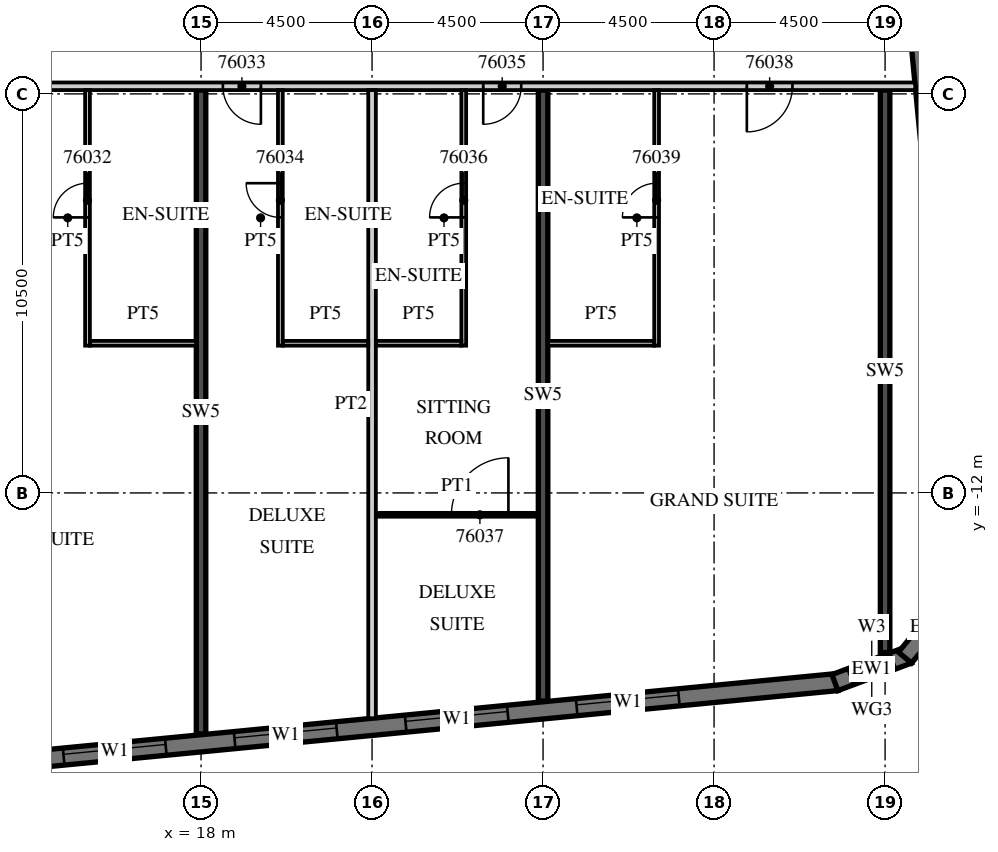
"""IFC4 building model, lengths in metres.
Left out: names, types, materials, properties, quantities, classifications, styles, units other than length and angle.
Written with IfcOpenShell. Run it as: python <this file> out.ifc"""

import sys

from ifc_helpers import new_model, si_unit, direction, frame, frame_2d, origin, place, context, subcontext, project, spatial, polyline, rectangle, outline, extrude, element, fill, save


model = new_model("IFC4")
c1 = context("Model", 3, precision=1e-05, world=origin(), true_north=direction((0.0, 1.0)))
c2 = subcontext(c1, "Body", "Model", "MODEL_VIEW")
j1 = project(units=[si_unit("LENGTHUNIT", "METRE"), si_unit("PLANEANGLEUNIT", "RADIAN")], contexts=[c1])
p1 = place(None, origin())
s1 = spatial("IfcSite", under=j1, at=p1, CompositionType="ELEMENT")
p2 = place(p1, origin())
s2 = spatial("IfcBuilding", under=s1, at=p2, CompositionType="ELEMENT")
p3 = place(p2, frame((0.0, 0.0, 301.5)))
s3 = spatial("IfcBuildingStorey", under=s2, at=p3, CompositionType="ELEMENT", Elevation=301.5)
p4 = place(p3, frame((18.0, -18.341, 0.0), z_axis=(0.0, 0.0, 1.0), x_axis=(0.0, 1.0, 0.0)))
e1 = element("IfcWall", 1, at=p4, inside=s3, PredefinedType="SHEAR", context=c2, shape_type="SweptSolid", body=[
    extrude(rectangle(XDim=16.941, YDim=0.25, at=frame_2d((8.47, 0.0))), origin(), (0.0, 0.0, 1.0), 3.3),
])
p5 = place(p3, frame((27.0, -17.474, 0.0), z_axis=(0.0, 0.0, 1.0), x_axis=(0.0, 1.0, 0.0)))
e2 = element("IfcWall", 2, at=p5, inside=s3, PredefinedType="SHEAR", context=c2, shape_type="SweptSolid", body=[
    extrude(rectangle(XDim=16.074, YDim=0.25, at=frame_2d((8.037, 0.0))), origin(), (0.0, 0.0, 1.0), 3.3),
])
p6 = place(p3, frame((36.0, -16.199, 0.0), z_axis=(0.0, 0.0, 1.0), x_axis=(0.0, 1.0, 0.0)))
e3 = element("IfcWall", 3, at=p6, inside=s3, PredefinedType="SHEAR", context=c2, shape_type="SweptSolid", body=[
    extrude(rectangle(XDim=14.799, YDim=0.25, at=frame_2d((7.399, 0.0))), origin(), (0.0, 0.0, 1.0), 3.3),
])
p7 = place(p3, frame((-13.521, -21.624, 0.0), z_axis=(0.0, 0.0, 1.0), x_axis=(0.995396186218, 0.095845878695, 0.0)))
e4 = element("IfcWall", 4, at=p7, inside=s3, PredefinedType="SOLIDWALL", context=c2, shape_type="SweptSolid", body=[
    extrude(rectangle(XDim=48.481, YDim=0.45, at=frame_2d((24.241, 0.0))), origin(), (0.0, 0.0, 1.0), 3.02),
])
p8 = place(p7, frame((0.91, 0.0, 0.45)))
e5 = element("IfcOpeningElement", 5, at=p8, cuts=e4, PredefinedType="OPENING", context=c2, shape_type="SweptSolid", body=[
    extrude(rectangle(XDim=2.7, YDim=2.25, at=frame_2d((1.35, 1.125))), frame((0.0, 0.235, 0.0), z_axis=(0.0, -1.0, 0.0), x_axis=(1.0, 0.0, 0.0)), (0.0, 0.0, 1.0), 0.47),
])
p9 = place(p7, frame((5.431, 0.0, 0.45)))
e6 = element("IfcOpeningElement", 6, at=p9, cuts=e4, PredefinedType="OPENING", context=c2, shape_type="SweptSolid", body=[
    extrude(rectangle(XDim=2.7, YDim=2.25, at=frame_2d((1.35, 1.125))), frame((0.0, 0.235, 0.0), z_axis=(0.0, -1.0, 0.0), x_axis=(1.0, 0.0, 0.0)), (0.0, 0.0, 1.0), 0.47),
])
p10 = place(p7, frame((9.952, 0.0, 0.45)))
e7 = element("IfcOpeningElement", 7, at=p10, cuts=e4, PredefinedType="OPENING", context=c2, shape_type="SweptSolid", body=[
    extrude(rectangle(XDim=2.7, YDim=2.25, at=frame_2d((1.35, 1.125))), frame((0.0, 0.235, 0.0), z_axis=(0.0, -1.0, 0.0), x_axis=(1.0, 0.0, 0.0)), (0.0, 0.0, 1.0), 0.47),
])
p11 = place(p7, frame((14.473, 0.0, 0.45)))
e8 = element("IfcOpeningElement", 8, at=p11, cuts=e4, PredefinedType="OPENING", context=c2, shape_type="SweptSolid", body=[
    extrude(rectangle(XDim=2.7, YDim=2.25, at=frame_2d((1.35, 1.125))), frame((0.0, 0.235, 0.0), z_axis=(0.0, -1.0, 0.0), x_axis=(1.0, 0.0, 0.0)), (0.0, 0.0, 1.0), 0.47),
])
p12 = place(p7, frame((18.994, 0.0, 0.45)))
e9 = element("IfcOpeningElement", 9, at=p12, cuts=e4, PredefinedType="OPENING", context=c2, shape_type="SweptSolid", body=[
    extrude(rectangle(XDim=2.7, YDim=2.25, at=frame_2d((1.35, 1.125))), frame((0.0, 0.235, 0.0), z_axis=(0.0, -1.0, 0.0), x_axis=(1.0, 0.0, 0.0)), (0.0, 0.0, 1.0), 0.47),
])
p13 = place(p7, frame((23.514, 0.0, 0.45)))
e10 = element("IfcOpeningElement", 10, at=p13, cuts=e4, PredefinedType="OPENING", context=c2, shape_type="SweptSolid", body=[
    extrude(rectangle(XDim=2.7, YDim=2.25, at=frame_2d((1.35, 1.125))), frame((0.0, 0.235, 0.0), z_axis=(0.0, -1.0, 0.0), x_axis=(1.0, 0.0, 0.0)), (0.0, 0.0, 1.0), 0.47),
])
p14 = place(p7, frame((28.035, 0.0, 0.45)))
e11 = element("IfcOpeningElement", 11, at=p14, cuts=e4, PredefinedType="OPENING", context=c2, shape_type="SweptSolid", body=[
    extrude(rectangle(XDim=2.7, YDim=2.25, at=frame_2d((1.35, 1.125))), frame((0.0, 0.235, 0.0), z_axis=(0.0, -1.0, 0.0), x_axis=(1.0, 0.0, 0.0)), (0.0, 0.0, 1.0), 0.47),
])
p15 = place(p7, frame((32.556, 0.0, 0.45)))
e12 = element("IfcOpeningElement", 12, at=p15, cuts=e4, PredefinedType="OPENING", context=c2, shape_type="SweptSolid", body=[
    extrude(rectangle(XDim=2.7, YDim=2.25, at=frame_2d((1.35, 1.125))), frame((0.0, 0.235, 0.0), z_axis=(0.0, -1.0, 0.0), x_axis=(1.0, 0.0, 0.0)), (0.0, 0.0, 1.0), 0.47),
])
p16 = place(p7, frame((37.077, 0.0, 0.45)))
e13 = element("IfcOpeningElement", 13, at=p16, cuts=e4, PredefinedType="OPENING", context=c2, shape_type="SweptSolid", body=[
    extrude(rectangle(XDim=2.7, YDim=2.25, at=frame_2d((1.35, 1.125))), frame((0.0, 0.235, 0.0), z_axis=(0.0, -1.0, 0.0), x_axis=(1.0, 0.0, 0.0)), (0.0, 0.0, 1.0), 0.47),
])
p17 = place(p7, frame((41.598, 0.0, 0.45)))
e14 = element("IfcOpeningElement", 14, at=p17, cuts=e4, PredefinedType="OPENING", context=c2, shape_type="SweptSolid", body=[
    extrude(rectangle(XDim=2.7, YDim=2.25, at=frame_2d((1.35, 1.125))), frame((0.0, 0.235, 0.0), z_axis=(0.0, -1.0, 0.0), x_axis=(1.0, 0.0, 0.0)), (0.0, 0.0, 1.0), 0.47),
])
p18 = place(p3, frame((34.679, -16.99, 0.0), z_axis=(0.0, 0.0, 1.0), x_axis=(0.936677599948, 0.350192909346, 0.0)))
e15 = element("IfcWall", 15, at=p18, inside=s3, PredefinedType="SOLIDWALL", context=c2, shape_type="SweptSolid", body=[
    extrude(outline(polyline([(0.0, -0.225), (2.071, -0.225), (1.95, 0.225), (0.121, 0.225), (0.0, -0.225)])), origin(), (0.0, 0.0, 1.0), 3.02),
])
p19 = place(p18, frame((0.435, 0.0, 0.45)))
e16 = element("IfcOpeningElement", 16, at=p19, cuts=e15, PredefinedType="OPENING", context=c2, shape_type="SweptSolid", body=[
    extrude(rectangle(XDim=1.2, YDim=2.25, at=frame_2d((0.6, 1.125))), frame((0.0, 0.235, 0.0), z_axis=(0.0, -1.0, 0.0), x_axis=(1.0, 0.0, 0.0)), (0.0, 0.0, 1.0), 0.47),
])
p20 = place(p3, frame((36.524, -16.333, 0.0), z_axis=(0.0, 0.0, 1.0), x_axis=(0.636046112757, 0.771651049663, 0.0)))
e17 = element("IfcWall", 17, at=p20, inside=s3, PredefinedType="SOLIDWALL", context=c2, shape_type="SweptSolid", body=[
    extrude(outline(polyline([(0.0, -0.225), (2.071, -0.225), (1.95, 0.225), (0.121, 0.225), (0.0, -0.225)])), origin(), (0.0, 0.0, 1.0), 3.02),
])
p21 = place(p3, frame((38.132, -12.858, 0.0), z_axis=(0.0, 0.0, 1.0), x_axis=(-0.095847749461, 0.995396006082, 0.0)))
e18 = element("IfcWall", 18, at=p21, inside=s3, PredefinedType="SOLIDWALL", context=c2, shape_type="SweptSolid", body=[
    extrude(rectangle(XDim=32.0, YDim=0.45, at=frame_2d((16.0, 0.0))), origin(), (0.0, 0.0, 1.0), 3.02),
])
p22 = place(p3, frame((-13.5, -1.3, 0.0), z_axis=(0.0, 0.0, 1.0), x_axis=(1.0, 0.0, 0.0)))
e19 = element("IfcWall", 19, at=p22, inside=s3, PredefinedType="PARTITIONING", context=c2, shape_type="SweptSolid", body=[
    extrude(rectangle(XDim=50.293, YDim=0.2, at=frame_2d((25.146, 0.0))), origin(), (0.0, 0.0, 1.0), 3.02),
])
p23 = place(p22, frame((0.575, 0.0, 0.0)))
e20 = element("IfcOpeningElement", 20, at=p23, cuts=e19, PredefinedType="OPENING", context=c2, shape_type="SweptSolid", body=[
    extrude(rectangle(XDim=1.0, YDim=2.1, at=frame_2d((0.5, 1.05))), frame((0.0, 0.11, 0.0), z_axis=(0.0, -1.0, 0.0), x_axis=(1.0, 0.0, 0.0)), (0.0, 0.0, 1.0), 0.22),
])
p24 = place(p22, frame((6.938, 0.0, 0.0)))
e21 = element("IfcOpeningElement", 21, at=p24, cuts=e19, PredefinedType="OPENING", context=c2, shape_type="SweptSolid", body=[
    extrude(rectangle(XDim=1.2, YDim=2.1, at=frame_2d((0.6, 1.05))), frame((0.0, 0.11, 0.0), z_axis=(0.0, -1.0, 0.0), x_axis=(1.0, 0.0, 0.0)), (0.0, 0.0, 1.0), 0.22),
])
p25 = place(p22, frame((16.45, 0.0, 0.0)))
e22 = element("IfcOpeningElement", 22, at=p25, cuts=e19, PredefinedType="OPENING", context=c2, shape_type="SweptSolid", body=[
    extrude(rectangle(XDim=1.0, YDim=2.1, at=frame_2d((0.5, 1.05))), frame((0.0, 0.11, 0.0), z_axis=(0.0, -1.0, 0.0), x_axis=(1.0, 0.0, 0.0)), (0.0, 0.0, 1.0), 0.22),
])
p26 = place(p22, frame((20.925, 0.0, 0.0)))
e23 = element("IfcOpeningElement", 23, at=p26, cuts=e19, PredefinedType="OPENING", context=c2, shape_type="SweptSolid", body=[
    extrude(rectangle(XDim=1.0, YDim=2.1, at=frame_2d((0.5, 1.05))), frame((0.0, 0.11, 0.0), z_axis=(0.0, -1.0, 0.0), x_axis=(1.0, 0.0, 0.0)), (0.0, 0.0, 1.0), 0.22),
])
p27 = place(p22, frame((24.938, 0.0, 0.0)))
e24 = element("IfcOpeningElement", 24, at=p27, cuts=e19, PredefinedType="OPENING", context=c2, shape_type="SweptSolid", body=[
    extrude(rectangle(XDim=1.2, YDim=2.1, at=frame_2d((0.6, 1.05))), frame((0.0, 0.11, 0.0), z_axis=(0.0, -1.0, 0.0), x_axis=(1.0, 0.0, 0.0)), (0.0, 0.0, 1.0), 0.22),
])
p28 = place(p22, frame((32.075, 0.0, 0.0)))
e25 = element("IfcOpeningElement", 25, at=p28, cuts=e19, PredefinedType="OPENING", context=c2, shape_type="SweptSolid", body=[
    extrude(rectangle(XDim=1.0, YDim=2.1, at=frame_2d((0.5, 1.05))), frame((0.0, 0.11, 0.0), z_axis=(0.0, -1.0, 0.0), x_axis=(1.0, 0.0, 0.0)), (0.0, 0.0, 1.0), 0.22),
])
p29 = place(p22, frame((38.925, 0.0, 0.0)))
e26 = element("IfcOpeningElement", 26, at=p29, cuts=e19, PredefinedType="OPENING", context=c2, shape_type="SweptSolid", body=[
    extrude(rectangle(XDim=1.0, YDim=2.1, at=frame_2d((0.5, 1.05))), frame((0.0, 0.11, 0.0), z_axis=(0.0, -1.0, 0.0), x_axis=(1.0, 0.0, 0.0)), (0.0, 0.0, 1.0), 0.22),
])
p30 = place(p22, frame((45.862, 0.0, 0.0)))
e27 = element("IfcOpeningElement", 27, at=p30, cuts=e19, PredefinedType="OPENING", context=c2, shape_type="SweptSolid", body=[
    extrude(rectangle(XDim=1.2, YDim=2.1, at=frame_2d((0.6, 1.05))), frame((0.0, 0.11, 0.0), z_axis=(0.0, -1.0, 0.0), x_axis=(1.0, 0.0, 0.0)), (0.0, 0.0, 1.0), 0.22),
])
p31 = place(p3, frame((15.012, -8.125, 0.0), z_axis=(0.0, 0.0, 1.0), x_axis=(0.0, 1.0, 0.0)))
e28 = element("IfcWall", 28, at=p31, inside=s3, PredefinedType="PARTITIONING", context=c2, shape_type="SweptSolid", body=[
    extrude(rectangle(XDim=6.725, YDim=0.125, at=frame_2d((3.363, 0.0))), origin(), (0.0, 0.0, 1.0), 3.02),
])
p32 = place(p31, frame((3.375, 0.0, 0.0)))
e29 = element("IfcOpeningElement", 29, at=p32, cuts=e28, PredefinedType="OPENING", context=c2, shape_type="SweptSolid", body=[
    extrude(rectangle(XDim=0.9, YDim=2.1, at=frame_2d((0.45, 1.05))), frame((0.0, 0.073, 0.0), z_axis=(0.0, -1.0, 0.0), x_axis=(1.0, 0.0, 0.0)), (0.0, 0.0, 1.0), 0.145),
])
p33 = place(p3, frame((15.075, -8.062, 0.0), z_axis=(0.0, 0.0, 1.0), x_axis=(1.0, 0.0, 0.0)))
e30 = element("IfcWall", 30, at=p33, inside=s3, PredefinedType="PARTITIONING", context=c2, shape_type="SweptSolid", body=[
    extrude(rectangle(XDim=2.8, YDim=0.125, at=frame_2d((1.4, 0.0))), origin(), (0.0, 0.0, 1.0), 3.02),
])
p34 = place(p3, frame((22.5, -17.929, 0.0), z_axis=(0.0, 0.0, 1.0), x_axis=(0.0, 1.0, 0.0)))
e31 = element("IfcWall", 31, at=p34, inside=s3, PredefinedType="PARTITIONING", context=c2, shape_type="SweptSolid", body=[
    extrude(rectangle(XDim=16.529, YDim=0.2, at=frame_2d((8.265, 0.0))), origin(), (0.0, 0.0, 1.0), 3.02),
])
p35 = place(p3, frame((20.087, -8.125, 0.0), z_axis=(0.0, 0.0, 1.0), x_axis=(0.0, 1.0, 0.0)))
e32 = element("IfcWall", 32, at=p35, inside=s3, PredefinedType="PARTITIONING", context=c2, shape_type="SweptSolid", body=[
    extrude(rectangle(XDim=6.725, YDim=0.125, at=frame_2d((3.363, 0.0))), origin(), (0.0, 0.0, 1.0), 3.02),
])
p36 = place(p35, frame((3.375, 0.0, 0.0)))
e33 = element("IfcOpeningElement", 33, at=p36, cuts=e32, PredefinedType="OPENING", context=c2, shape_type="SweptSolid", body=[
    extrude(rectangle(XDim=0.9, YDim=2.1, at=frame_2d((0.45, 1.05))), frame((0.0, 0.073, 0.0), z_axis=(0.0, -1.0, 0.0), x_axis=(1.0, 0.0, 0.0)), (0.0, 0.0, 1.0), 0.145),
])
p37 = place(p3, frame((20.15, -8.062, 0.0), z_axis=(0.0, 0.0, 1.0), x_axis=(1.0, 0.0, 0.0)))
e34 = element("IfcWall", 34, at=p37, inside=s3, PredefinedType="PARTITIONING", context=c2, shape_type="SweptSolid", body=[
    extrude(rectangle(XDim=2.25, YDim=0.125, at=frame_2d((1.125, 0.0))), origin(), (0.0, 0.0, 1.0), 3.02),
])
p38 = place(p3, frame((24.913, -8.125, 0.0), z_axis=(0.0, 0.0, 1.0), x_axis=(0.0, 1.0, 0.0)))
e35 = element("IfcWall", 35, at=p38, inside=s3, PredefinedType="PARTITIONING", context=c2, shape_type="SweptSolid", body=[
    extrude(rectangle(XDim=6.725, YDim=0.125, at=frame_2d((3.363, 0.0))), origin(), (0.0, 0.0, 1.0), 3.02),
])
p39 = place(p38, frame((3.375, 0.0, 0.0)))
e36 = element("IfcOpeningElement", 36, at=p39, cuts=e35, PredefinedType="OPENING", context=c2, shape_type="SweptSolid", body=[
    extrude(rectangle(XDim=0.9, YDim=2.1, at=frame_2d((0.45, 1.05))), frame((0.0, 0.073, 0.0), z_axis=(0.0, -1.0, 0.0), x_axis=(1.0, 0.0, 0.0)), (0.0, 0.0, 1.0), 0.145),
])
p40 = place(p3, frame((22.6, -8.062, 0.0), z_axis=(0.0, 0.0, 1.0), x_axis=(1.0, 0.0, 0.0)))
e37 = element("IfcWall", 37, at=p40, inside=s3, PredefinedType="PARTITIONING", context=c2, shape_type="SweptSolid", body=[
    extrude(rectangle(XDim=2.25, YDim=0.125, at=frame_2d((1.125, 0.0))), origin(), (0.0, 0.0, 1.0), 3.02),
])
p41 = place(p3, frame((22.6, -12.575, 0.0), z_axis=(0.0, 0.0, 1.0), x_axis=(1.0, 0.0, 0.0)))
e38 = element("IfcWall", 38, at=p41, inside=s3, PredefinedType="PARTITIONING", context=c2, shape_type="SweptSolid", body=[
    extrude(rectangle(XDim=4.275, YDim=0.1, at=frame_2d((2.137, 0.0))), origin(), (0.0, 0.0, 1.0), 3.02),
])
p42 = place(p41, frame((1.988, 0.0, 0.0)))
e39 = element("IfcOpeningElement", 39, at=p42, cuts=e38, PredefinedType="OPENING", context=c2, shape_type="SweptSolid", body=[
    extrude(rectangle(XDim=1.5, YDim=2.1, at=frame_2d((0.75, 1.05))), frame((0.0, 0.06, 0.0), z_axis=(0.0, -1.0, 0.0), x_axis=(1.0, 0.0, 0.0)), (0.0, 0.0, 1.0), 0.12),
])
p43 = place(p3, frame((29.988, -8.125, 0.0), z_axis=(0.0, 0.0, 1.0), x_axis=(0.0, 1.0, 0.0)))
e40 = element("IfcWall", 40, at=p43, inside=s3, PredefinedType="PARTITIONING", context=c2, shape_type="SweptSolid", body=[
    extrude(rectangle(XDim=6.725, YDim=0.125, at=frame_2d((3.363, 0.0))), origin(), (0.0, 0.0, 1.0), 3.02),
])
p44 = place(p43, frame((3.375, 0.0, 0.0)))
e41 = element("IfcOpeningElement", 41, at=p44, cuts=e40, PredefinedType="OPENING", context=c2, shape_type="SweptSolid", body=[
    extrude(rectangle(XDim=0.9, YDim=2.1, at=frame_2d((0.45, 1.05))), frame((0.0, 0.073, 0.0), z_axis=(0.0, -1.0, 0.0), x_axis=(1.0, 0.0, 0.0)), (0.0, 0.0, 1.0), 0.145),
])
p45 = place(p3, frame((27.125, -8.062, 0.0), z_axis=(0.0, 0.0, 1.0), x_axis=(1.0, 0.0, 0.0)))
e42 = element("IfcWall", 42, at=p45, inside=s3, PredefinedType="PARTITIONING", context=c2, shape_type="SweptSolid", body=[
    extrude(rectangle(XDim=2.8, YDim=0.125, at=frame_2d((1.4, 0.0))), origin(), (0.0, 0.0, 1.0), 3.02),
])
p46 = place(p14, origin())
e43 = element("IfcWindow", 43, at=p46, inside=s3, PartitioningType="SINGLE_PANEL", PredefinedType="WINDOW", context=c2, shape_type="SweptSolid", body=[
    extrude(rectangle(XDim=2.7, YDim=2.25, at=frame_2d((1.35, 1.125))), frame((0.0, 0.09, 0.0), z_axis=(0.0, -1.0, 0.0), x_axis=(1.0, 0.0, 0.0)), (0.0, 0.0, 1.0), 0.06),
])
fill(e11, e43)
p47 = place(p15, origin())
e44 = element("IfcWindow", 44, at=p47, inside=s3, PartitioningType="SINGLE_PANEL", PredefinedType="WINDOW", context=c2, shape_type="SweptSolid", body=[
    extrude(rectangle(XDim=2.7, YDim=2.25, at=frame_2d((1.35, 1.125))), frame((0.0, 0.09, 0.0), z_axis=(0.0, -1.0, 0.0), x_axis=(1.0, 0.0, 0.0)), (0.0, 0.0, 1.0), 0.06),
])
fill(e12, e44)
p48 = place(p16, origin())
e45 = element("IfcWindow", 45, at=p48, inside=s3, PartitioningType="SINGLE_PANEL", PredefinedType="WINDOW", context=c2, shape_type="SweptSolid", body=[
    extrude(rectangle(XDim=2.7, YDim=2.25, at=frame_2d((1.35, 1.125))), frame((0.0, 0.09, 0.0), z_axis=(0.0, -1.0, 0.0), x_axis=(1.0, 0.0, 0.0)), (0.0, 0.0, 1.0), 0.06),
])
fill(e13, e45)
p49 = place(p17, origin())
e46 = element("IfcWindow", 46, at=p49, inside=s3, PartitioningType="SINGLE_PANEL", PredefinedType="WINDOW", context=c2, shape_type="SweptSolid", body=[
    extrude(rectangle(XDim=2.7, YDim=2.25, at=frame_2d((1.35, 1.125))), frame((0.0, 0.09, 0.0), z_axis=(0.0, -1.0, 0.0), x_axis=(1.0, 0.0, 0.0)), (0.0, 0.0, 1.0), 0.06),
])
fill(e14, e46)
p50 = place(p19, origin())
e47 = element("IfcWindow", 47, at=p50, inside=s3, PartitioningType="SINGLE_PANEL", PredefinedType="WINDOW", context=c2, shape_type="SweptSolid", body=[
    extrude(rectangle(XDim=1.2, YDim=2.25, at=frame_2d((0.6, 1.125))), frame((0.0, 0.09, 0.0), z_axis=(0.0, -1.0, 0.0), x_axis=(1.0, 0.0, 0.0)), (0.0, 0.0, 1.0), 0.06),
])
fill(e16, e47)
p51 = place(p32, origin())
e48 = element("IfcDoor", 48, at=p51, inside=s3, OperationType="SINGLE_SWING_LEFT", PredefinedType="DOOR", context=c2, shape_type="SweptSolid", body=[
    extrude(rectangle(XDim=0.9, YDim=2.1, at=frame_2d((0.45, 1.05))), frame((0.0, 0.025, 0.0), z_axis=(0.0, -1.0, 0.0), x_axis=(1.0, 0.0, 0.0)), (0.0, 0.0, 1.0), 0.05),
])
fill(e29, e48)
p52 = place(p28, origin())
e49 = element("IfcDoor", 49, at=p52, inside=s3, OperationType="SINGLE_SWING_RIGHT", PredefinedType="DOOR", context=c2, shape_type="SweptSolid", body=[
    extrude(rectangle(XDim=1.0, YDim=2.1, at=frame_2d((0.5, 1.05))), frame((0.0, 0.025, 0.0), z_axis=(0.0, -1.0, 0.0), x_axis=(1.0, 0.0, 0.0)), (0.0, 0.0, 1.0), 0.05),
])
fill(e25, e49)
p53 = place(p36, origin())
e50 = element("IfcDoor", 50, at=p53, inside=s3, OperationType="SINGLE_SWING_RIGHT", PredefinedType="DOOR", context=c2, shape_type="SweptSolid", body=[
    extrude(rectangle(XDim=0.9, YDim=2.1, at=frame_2d((0.45, 1.05))), frame((0.0, 0.025, 0.0), z_axis=(0.0, -1.0, 0.0), x_axis=(1.0, 0.0, 0.0)), (0.0, 0.0, 1.0), 0.05),
])
fill(e33, e50)
p54 = place(p29, origin())
e51 = element("IfcDoor", 51, at=p54, inside=s3, OperationType="SINGLE_SWING_LEFT", PredefinedType="DOOR", context=c2, shape_type="SweptSolid", body=[
    extrude(rectangle(XDim=1.0, YDim=2.1, at=frame_2d((0.5, 1.05))), frame((0.0, 0.025, 0.0), z_axis=(0.0, -1.0, 0.0), x_axis=(1.0, 0.0, 0.0)), (0.0, 0.0, 1.0), 0.05),
])
fill(e26, e51)
p55 = place(p39, origin())
e52 = element("IfcDoor", 52, at=p55, inside=s3, OperationType="SINGLE_SWING_LEFT", PredefinedType="DOOR", context=c2, shape_type="SweptSolid", body=[
    extrude(rectangle(XDim=0.9, YDim=2.1, at=frame_2d((0.45, 1.05))), frame((0.0, 0.025, 0.0), z_axis=(0.0, -1.0, 0.0), x_axis=(1.0, 0.0, 0.0)), (0.0, 0.0, 1.0), 0.05),
])
fill(e36, e52)
p56 = place(p42, origin())
e53 = element("IfcDoor", 53, at=p56, inside=s3, OperationType="SINGLE_SWING_RIGHT", PredefinedType="DOOR", context=c2, shape_type="SweptSolid", body=[
    extrude(rectangle(XDim=1.5, YDim=2.1, at=frame_2d((0.75, 1.05))), frame((0.0, 0.025, 0.0), z_axis=(0.0, -1.0, 0.0), x_axis=(1.0, 0.0, 0.0)), (0.0, 0.0, 1.0), 0.05),
])
fill(e39, e53)
p57 = place(p30, origin())
e54 = element("IfcDoor", 54, at=p57, inside=s3, OperationType="SINGLE_SWING_LEFT", PredefinedType="DOOR", context=c2, shape_type="SweptSolid", body=[
    extrude(rectangle(XDim=1.2, YDim=2.1, at=frame_2d((0.6, 1.05))), frame((0.0, 0.025, 0.0), z_axis=(0.0, -1.0, 0.0), x_axis=(1.0, 0.0, 0.0)), (0.0, 0.0, 1.0), 0.05),
])
fill(e27, e54)
p58 = place(p44, origin())
e55 = element("IfcDoor", 55, at=p58, inside=s3, OperationType="SINGLE_SWING_LEFT", PredefinedType="DOOR", context=c2, shape_type="SweptSolid", body=[
    extrude(rectangle(XDim=0.9, YDim=2.1, at=frame_2d((0.45, 1.05))), frame((0.0, 0.025, 0.0), z_axis=(0.0, -1.0, 0.0), x_axis=(1.0, 0.0, 0.0)), (0.0, 0.0, 1.0), 0.05),
])
fill(e41, e55)
save(model, sys.argv[1])
